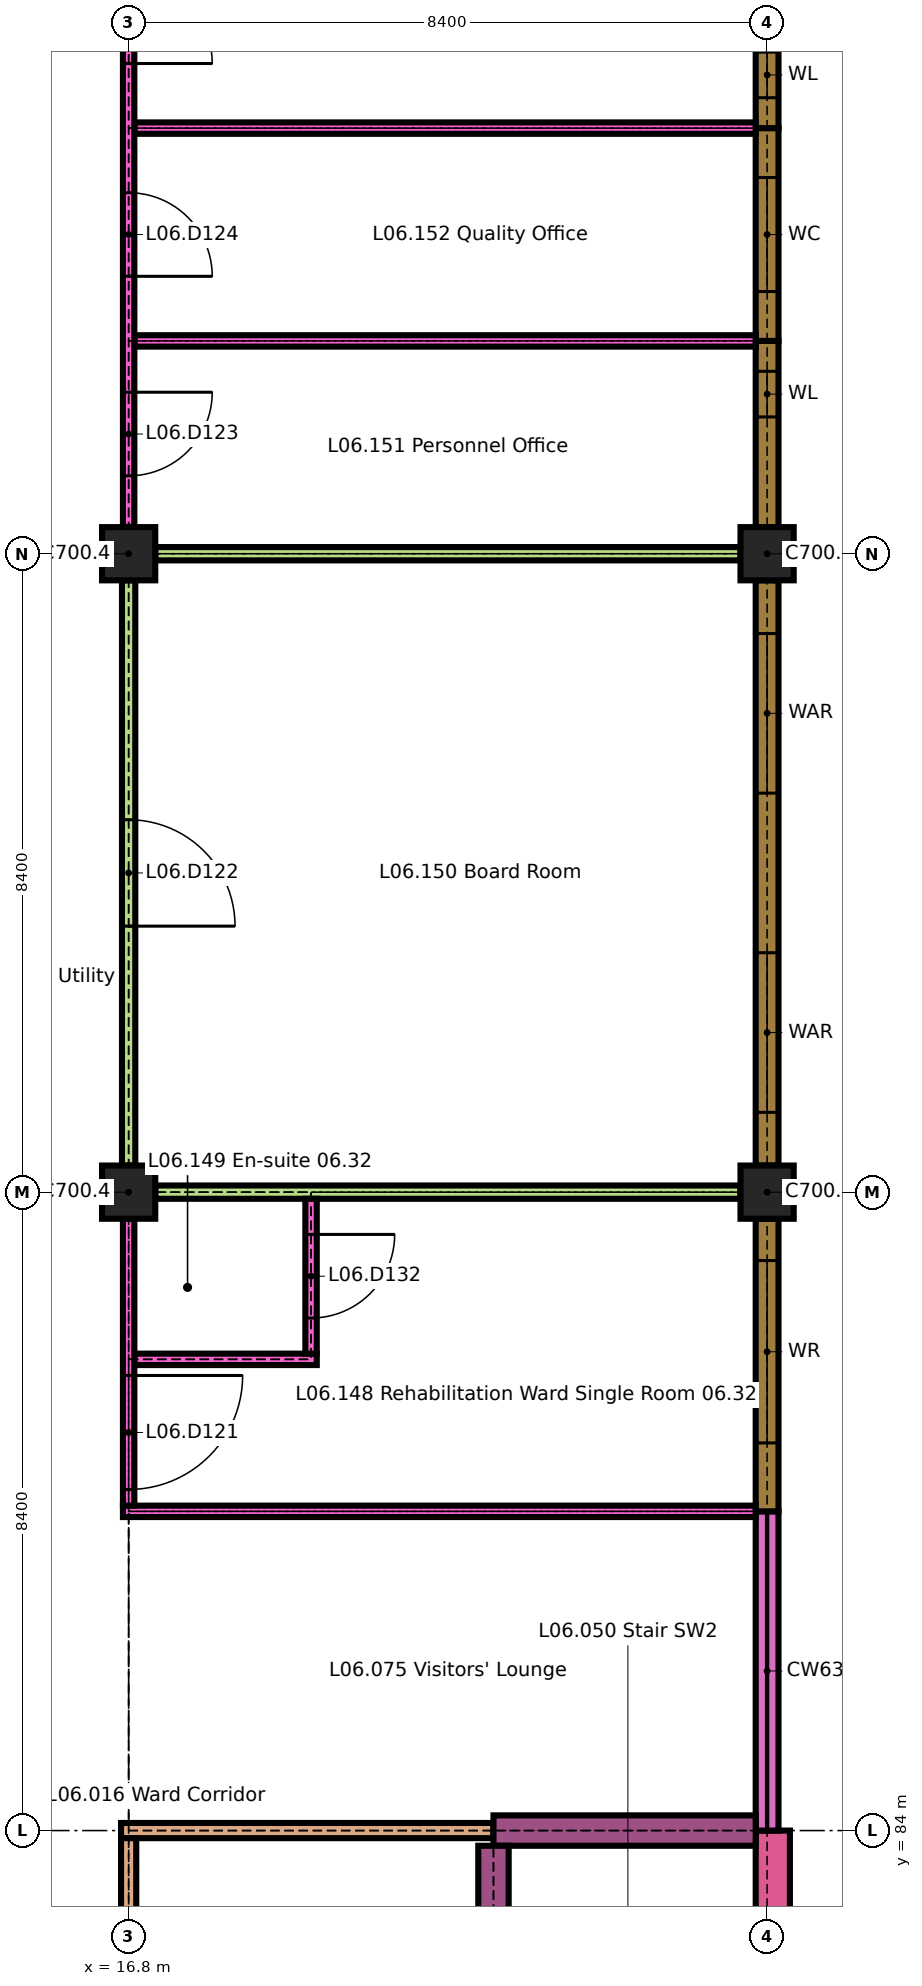
"""IFC4 building model, lengths in metres.
Left out: names, types, materials, properties, quantities, classifications, styles, units other than length and angle.
Written with IfcOpenShell. Run it as: python <this file> out.ifc"""

import sys

from ifc_helpers import new_model, si_unit, direction, frame, frame_2d, origin, origin_2d, place, context, subcontext, project, spatial, rectangle, extrude, element, fill, save


model = new_model("IFC4")
c1 = context("Model", 3, precision=1e-05, world=origin(), true_north=direction((0.0, 1.0)))
c2 = subcontext(c1, "Body", "Model", "MODEL_VIEW")
j1 = project(units=[si_unit("LENGTHUNIT", "METRE"), si_unit("PLANEANGLEUNIT", "RADIAN")], contexts=[c1])
p1 = place(None, origin())
s1 = spatial("IfcSite", under=j1, at=p1, CompositionType="ELEMENT")
p2 = place(p1, origin())
s2 = spatial("IfcBuilding", under=s1, at=p2, CompositionType="ELEMENT")
p3 = place(p2, frame((0.0, 0.0, 26.1)))
s3 = spatial("IfcBuildingStorey", under=s2, at=p3, CompositionType="ELEMENT", Elevation=26.1)
p4 = place(p3, frame((16.8, 92.4, 0.0), z_axis=(0.0, 0.0, 1.0), x_axis=(1.0, 0.0, 0.0)))
e1 = element("IfcColumn", 1, at=p4, inside=s3, PredefinedType="COLUMN", context=c2, shape_type="SweptSolid", body=[
    extrude(rectangle(XDim=0.7, YDim=0.7, at=origin_2d()), origin(), (0.0, 0.0, 1.0), 3.3),
])
p5 = place(p3, frame((25.2, 92.4, 0.0), z_axis=(0.0, 0.0, 1.0), x_axis=(1.0, 0.0, 0.0)))
e2 = element("IfcColumn", 2, at=p5, inside=s3, PredefinedType="COLUMN", context=c2, shape_type="SweptSolid", body=[
    extrude(rectangle(XDim=0.7, YDim=0.7, at=origin_2d()), origin(), (0.0, 0.0, 1.0), 3.2),
])
p6 = place(p3, frame((16.8, 100.8, 0.0), z_axis=(0.0, 0.0, 1.0), x_axis=(1.0, 0.0, 0.0)))
e3 = element("IfcColumn", 3, at=p6, inside=s3, PredefinedType="COLUMN", context=c2, shape_type="SweptSolid", body=[
    extrude(rectangle(XDim=0.7, YDim=0.7, at=origin_2d()), origin(), (0.0, 0.0, 1.0), 3.3),
])
p7 = place(p3, frame((25.2, 100.8, 0.0), z_axis=(0.0, 0.0, 1.0), x_axis=(1.0, 0.0, 0.0)))
e4 = element("IfcColumn", 4, at=p7, inside=s3, PredefinedType="COLUMN", context=c2, shape_type="SweptSolid", body=[
    extrude(rectangle(XDim=0.7, YDim=0.7, at=origin_2d()), origin(), (0.0, 0.0, 1.0), 3.2),
])
p8 = place(p3, frame((25.275, 80.15, 0.0), z_axis=(0.0, 0.0, 1.0), x_axis=(0.0, 1.0, 0.0)))
e5 = element("IfcWall", 5, at=p8, inside=s3, PredefinedType="SOLIDWALL", context=c2, shape_type="SweptSolid", body=[
    extrude(rectangle(XDim=3.85, YDim=0.45, at=frame_2d((1.925, 0.0))), origin(), (0.0, 0.0, 1.0), 3.3),
])
p9 = place(p3, frame((25.2, 84.0, 0.0), z_axis=(0.0, 0.0, 1.0), x_axis=(0.0, 1.0, 0.0)))
e6 = element("IfcWall", 6, at=p9, inside=s3, PredefinedType="SOLIDWALL", context=c2, shape_type="SweptSolid", body=[
    extrude(rectangle(XDim=4.2, YDim=0.3, at=frame_2d((2.1, 0.0))), origin(), (0.0, 0.0, 1.0), 0.6),
])
p10 = place(p3, frame((25.2, 88.2, 0.0), z_axis=(0.0, 0.0, 1.0), x_axis=(0.0, 1.0, 0.0)))
e7 = element("IfcWall", 7, at=p10, inside=s3, PredefinedType="SOLIDWALL", context=c2, shape_type="SweptSolid", body=[
    extrude(rectangle(XDim=3.85, YDim=0.3, at=frame_2d((1.925, 0.0))), origin(), (0.0, 0.0, 1.0), 2.9),
])
p11 = place(p10, frame((0.9, 0.0, 0.6)))
e8 = element("IfcOpeningElement", 8, at=p11, cuts=e7, PredefinedType="OPENING", context=c2, shape_type="SweptSolid", body=[
    extrude(rectangle(XDim=2.4, YDim=1.8, at=frame_2d((1.2, 0.9))), frame((0.0, 0.16, 0.0), z_axis=(0.0, -1.0, 0.0), x_axis=(1.0, 0.0, 0.0)), (0.0, 0.0, 1.0), 0.32),
])
p12 = place(p3, frame((25.2, 92.75, 0.0), z_axis=(0.0, 0.0, 1.0), x_axis=(0.0, 1.0, 0.0)))
e9 = element("IfcWall", 9, at=p12, inside=s3, PredefinedType="SOLIDWALL", context=c2, shape_type="SweptSolid", body=[
    extrude(rectangle(XDim=7.7, YDim=0.3, at=frame_2d((3.85, 0.0))), origin(), (0.0, 0.0, 1.0), 2.9),
])
p13 = place(p12, frame((0.7, 0.0, 0.9)))
e10 = element("IfcOpeningElement", 10, at=p13, cuts=e9, PredefinedType="OPENING", context=c2, shape_type="SweptSolid", body=[
    extrude(rectangle(XDim=2.1, YDim=1.5, at=frame_2d((1.05, 0.75))), frame((0.0, 0.16, 0.0), z_axis=(0.0, -1.0, 0.0), x_axis=(1.0, 0.0, 0.0)), (0.0, 0.0, 1.0), 0.32),
])
p14 = place(p12, frame((4.9, 0.0, 0.9)))
e11 = element("IfcOpeningElement", 11, at=p14, cuts=e9, PredefinedType="OPENING", context=c2, shape_type="SweptSolid", body=[
    extrude(rectangle(XDim=2.1, YDim=1.5, at=frame_2d((1.05, 0.75))), frame((0.0, 0.16, 0.0), z_axis=(0.0, -1.0, 0.0), x_axis=(1.0, 0.0, 0.0)), (0.0, 0.0, 1.0), 0.32),
])
p15 = place(p3, frame((25.2, 101.15, 0.0), z_axis=(0.0, 0.0, 1.0), x_axis=(0.0, 1.0, 0.0)))
e12 = element("IfcWall", 12, at=p15, inside=s3, PredefinedType="SOLIDWALL", context=c2, shape_type="SweptSolid", body=[
    extrude(rectangle(XDim=2.45, YDim=0.3, at=frame_2d((1.225, 0.0))), origin(), (0.0, 0.0, 1.0), 2.9),
])
p16 = place(p15, frame((1.45, 0.0, 0.9)))
e13 = element("IfcOpeningElement", 13, at=p16, cuts=e12, PredefinedType="OPENING", context=c2, shape_type="SweptSolid", body=[
    extrude(rectangle(XDim=0.6, YDim=1.5, at=frame_2d((0.3, 0.75))), frame((0.0, 0.16, 0.0), z_axis=(0.0, -1.0, 0.0), x_axis=(1.0, 0.0, 0.0)), (0.0, 0.0, 1.0), 0.32),
])
p17 = place(p3, frame((25.2, 103.6, 0.0), z_axis=(0.0, 0.0, 1.0), x_axis=(0.0, 1.0, 0.0)))
e14 = element("IfcWall", 14, at=p17, inside=s3, PredefinedType="SOLIDWALL", context=c2, shape_type="SweptSolid", body=[
    extrude(rectangle(XDim=2.8, YDim=0.3, at=frame_2d((1.4, 0.0))), origin(), (0.0, 0.0, 1.0), 2.9),
])
p18 = place(p17, frame((0.65, 0.0, 0.9)))
e15 = element("IfcOpeningElement", 15, at=p18, cuts=e14, PredefinedType="OPENING", context=c2, shape_type="SweptSolid", body=[
    extrude(rectangle(XDim=1.5, YDim=1.5, at=frame_2d((0.75, 0.75))), frame((0.0, 0.16, 0.0), z_axis=(0.0, -1.0, 0.0), x_axis=(1.0, 0.0, 0.0)), (0.0, 0.0, 1.0), 0.32),
])
p19 = place(p3, frame((25.2, 106.4, 0.0), z_axis=(0.0, 0.0, 1.0), x_axis=(0.0, 1.0, 0.0)))
e16 = element("IfcWall", 16, at=p19, inside=s3, PredefinedType="SOLIDWALL", context=c2, shape_type="SweptSolid", body=[
    extrude(rectangle(XDim=2.8, YDim=0.3, at=frame_2d((1.4, 0.0))), origin(), (0.0, 0.0, 1.0), 2.9),
])
p20 = place(p19, frame((0.4, 0.0, 0.9)))
e17 = element("IfcOpeningElement", 17, at=p20, cuts=e16, PredefinedType="OPENING", context=c2, shape_type="SweptSolid", body=[
    extrude(rectangle(XDim=0.6, YDim=1.5, at=frame_2d((0.3, 0.75))), frame((0.0, 0.16, 0.0), z_axis=(0.0, -1.0, 0.0), x_axis=(1.0, 0.0, 0.0)), (0.0, 0.0, 1.0), 0.32),
])
p21 = place(p3, frame((16.7, 84.0, 0.0), z_axis=(0.0, 0.0, 1.0), x_axis=(1.0, 0.0, 0.0)))
e18 = element("IfcWall", 18, at=p21, inside=s3, PredefinedType="PARTITIONING", context=c2, shape_type="SweptSolid", body=[
    extrude(rectangle(XDim=4.9, YDim=0.2, at=frame_2d((2.45, 0.0))), origin(), (0.0, 0.0, 1.0), 3.3),
])
p22 = place(p3, frame((21.6, 84.0, 0.0), z_axis=(0.0, 0.0, 1.0), x_axis=(1.0, 0.0, 0.0)))
e19 = element("IfcWall", 19, at=p22, inside=s3, PredefinedType="SHEAR", context=c2, shape_type="SweptSolid", body=[
    extrude(rectangle(XDim=3.45, YDim=0.4, at=frame_2d((1.725, 0.0))), origin(), (0.0, 0.0, 1.0), 3.3),
])
p23 = place(p3, frame((16.725, 88.2, 0.0), z_axis=(0.0, 0.0, 1.0), x_axis=(1.0, 0.0, 0.0)))
e20 = element("IfcWall", 20, at=p23, inside=s3, PredefinedType="PARTITIONING", context=c2, shape_type="SweptSolid", body=[
    extrude(rectangle(XDim=8.325, YDim=0.15, at=frame_2d((4.163, 0.0))), origin(), (0.0, 0.0, 1.0), 3.3),
])
p24 = place(p3, frame((16.875, 90.2, 0.0), z_axis=(0.0, 0.0, 1.0), x_axis=(1.0, 0.0, 0.0)))
e21 = element("IfcWall", 21, at=p24, inside=s3, PredefinedType="PARTITIONING", context=c2, shape_type="SweptSolid", body=[
    extrude(rectangle(XDim=2.4, YDim=0.15, at=frame_2d((1.2, 0.0))), origin(), (0.0, 0.0, 1.0), 3.3),
])
for number, where, z_axis, x_axis in (
    (22, (17.15, 92.4, 0.0), (0.0, 0.0, 1.0), (1.0, 0.0, 0.0)),
    (23, (17.15, 100.8, 0.0), (0.0, 0.0, 1.0), (1.0, 0.0, 0.0)),
):
    element("IfcWall", number, at=place(p3, frame(where, z_axis=z_axis, x_axis=x_axis)), inside=s3, PredefinedType="PARTITIONING", context=c2, shape_type="SweptSolid", body=[
        extrude(rectangle(XDim=7.7, YDim=0.175, at=frame_2d((3.85, 0.0))), origin(), (0.0, 0.0, 1.0), 3.3),
    ])
for number, where, z_axis, x_axis in (
    (24, (16.875, 103.6, 0.0), (0.0, 0.0, 1.0), (1.0, 0.0, 0.0)),
    (25, (16.875, 106.4, 0.0), (0.0, 0.0, 1.0), (1.0, 0.0, 0.0)),
):
    element("IfcWall", number, at=place(p3, frame(where, z_axis=z_axis, x_axis=x_axis)), inside=s3, PredefinedType="PARTITIONING", context=c2, shape_type="SweptSolid", body=[
        extrude(rectangle(XDim=8.175, YDim=0.15, at=frame_2d((4.087, 0.0))), origin(), (0.0, 0.0, 1.0), 3.3),
    ])
p25 = place(p3, frame((16.8, 75.7, 0.0), z_axis=(0.0, 0.0, 1.0), x_axis=(0.0, 1.0, 0.0)))
e26 = element("IfcWall", 26, at=p25, inside=s3, PredefinedType="PARTITIONING", context=c2, shape_type="SweptSolid", body=[
    extrude(rectangle(XDim=8.2, YDim=0.2, at=frame_2d((4.1, 0.0))), origin(), (0.0, 0.0, 1.0), 3.3),
])
p26 = place(p25, frame((3.1, 0.0, 0.0)))
e27 = element("IfcOpeningElement", 27, at=p26, cuts=e26, PredefinedType="OPENING", context=c2, shape_type="SweptSolid", body=[
    extrude(rectangle(XDim=2.0, YDim=2.4, at=frame_2d((1.0, 1.2))), frame((0.0, 0.11, 0.0), z_axis=(0.0, -1.0, 0.0), x_axis=(1.0, 0.0, 0.0)), (0.0, 0.0, 1.0), 0.22),
])
p27 = place(p3, frame((16.8, 88.275, 0.0), z_axis=(0.0, 0.0, 1.0), x_axis=(0.0, 1.0, 0.0)))
e28 = element("IfcWall", 28, at=p27, inside=s3, PredefinedType="PARTITIONING", context=c2, shape_type="SweptSolid", body=[
    extrude(rectangle(XDim=3.775, YDim=0.15, at=frame_2d((1.888, 0.0))), origin(), (0.0, 0.0, 1.0), 3.3),
])
p28 = place(p27, frame((0.212, 0.0, 0.0)))
e29 = element("IfcOpeningElement", 29, at=p28, cuts=e28, PredefinedType="OPENING", context=c2, shape_type="SweptSolid", body=[
    extrude(rectangle(XDim=1.5, YDim=2.4, at=frame_2d((0.75, 1.2))), frame((0.0, 0.085, 0.0), z_axis=(0.0, -1.0, 0.0), x_axis=(1.0, 0.0, 0.0)), (0.0, 0.0, 1.0), 0.17),
])
p29 = place(p3, frame((16.8, 92.75, 0.0), z_axis=(0.0, 0.0, 1.0), x_axis=(0.0, 1.0, 0.0)))
e30 = element("IfcWall", 30, at=p29, inside=s3, PredefinedType="PARTITIONING", context=c2, shape_type="SweptSolid", body=[
    extrude(rectangle(XDim=7.7, YDim=0.175, at=frame_2d((3.85, 0.0))), origin(), (0.0, 0.0, 1.0), 3.3),
])
p30 = place(p29, frame((3.15, 0.0, 0.0)))
e31 = element("IfcOpeningElement", 31, at=p30, cuts=e30, PredefinedType="OPENING", context=c2, shape_type="SweptSolid", body=[
    extrude(rectangle(XDim=1.4, YDim=2.1, at=frame_2d((0.7, 1.05))), frame((0.0, 0.097, 0.0), z_axis=(0.0, -1.0, 0.0), x_axis=(1.0, 0.0, 0.0)), (0.0, 0.0, 1.0), 0.195),
])
p31 = place(p3, frame((16.8, 101.15, 0.0), z_axis=(0.0, 0.0, 1.0), x_axis=(0.0, 1.0, 0.0)))
e32 = element("IfcWall", 32, at=p31, inside=s3, PredefinedType="PARTITIONING", context=c2, shape_type="SweptSolid", body=[
    extrude(rectangle(XDim=8.05, YDim=0.15, at=frame_2d((4.025, 0.0))), origin(), (0.0, 0.0, 1.0), 3.3),
])
p32 = place(p31, frame((0.675, 0.0, 0.0)))
e33 = element("IfcOpeningElement", 33, at=p32, cuts=e32, PredefinedType="OPENING", context=c2, shape_type="SweptSolid", body=[
    extrude(rectangle(XDim=1.1, YDim=2.1, at=frame_2d((0.55, 1.05))), frame((0.0, 0.085, 0.0), z_axis=(0.0, -1.0, 0.0), x_axis=(1.0, 0.0, 0.0)), (0.0, 0.0, 1.0), 0.17),
])
p33 = place(p31, frame((3.3, 0.0, 0.0)))
e34 = element("IfcOpeningElement", 34, at=p33, cuts=e32, PredefinedType="OPENING", context=c2, shape_type="SweptSolid", body=[
    extrude(rectangle(XDim=1.1, YDim=2.1, at=frame_2d((0.55, 1.05))), frame((0.0, 0.085, 0.0), z_axis=(0.0, -1.0, 0.0), x_axis=(1.0, 0.0, 0.0)), (0.0, 0.0, 1.0), 0.17),
])
p34 = place(p31, frame((6.1, 0.0, 0.0)))
e35 = element("IfcOpeningElement", 35, at=p34, cuts=e32, PredefinedType="OPENING", context=c2, shape_type="SweptSolid", body=[
    extrude(rectangle(XDim=1.1, YDim=2.1, at=frame_2d((0.55, 1.05))), frame((0.0, 0.085, 0.0), z_axis=(0.0, -1.0, 0.0), x_axis=(1.0, 0.0, 0.0)), (0.0, 0.0, 1.0), 0.17),
])
p35 = place(p3, frame((19.2, 90.275, 0.0), z_axis=(0.0, 0.0, 1.0), x_axis=(0.0, 1.0, 0.0)))
e36 = element("IfcWall", 36, at=p35, inside=s3, PredefinedType="PARTITIONING", context=c2, shape_type="SweptSolid", body=[
    extrude(rectangle(XDim=2.038, YDim=0.15, at=frame_2d((1.019, 0.0))), origin(), (0.0, 0.0, 1.0), 3.3),
])
p36 = place(p35, frame((0.469, 0.0, 0.0)))
e37 = element("IfcOpeningElement", 37, at=p36, cuts=e36, PredefinedType="OPENING", context=c2, shape_type="SweptSolid", body=[
    extrude(rectangle(XDim=1.1, YDim=2.1, at=frame_2d((0.55, 1.05))), frame((0.0, 0.085, 0.0), z_axis=(0.0, -1.0, 0.0), x_axis=(1.0, 0.0, 0.0)), (0.0, 0.0, 1.0), 0.17),
])
p37 = place(p3, frame((21.6, 75.8, 0.0), z_axis=(0.0, 0.0, 1.0), x_axis=(0.0, 1.0, 0.0)))
e38 = element("IfcWall", 38, at=p37, inside=s3, PredefinedType="SHEAR", context=c2, shape_type="SweptSolid", body=[
    extrude(rectangle(XDim=8.0, YDim=0.4, at=frame_2d((4.0, 0.0))), origin(), (0.0, 0.0, 1.0), 3.3),
])
p38 = place(p37, frame((0.4, 0.0, 0.0)))
e39 = element("IfcOpeningElement", 39, at=p38, cuts=e38, PredefinedType="OPENING", context=c2, shape_type="SweptSolid", body=[
    extrude(rectangle(XDim=1.2, YDim=2.1, at=frame_2d((0.6, 1.05))), frame((0.0, 0.21, 0.0), z_axis=(0.0, -1.0, 0.0), x_axis=(1.0, 0.0, 0.0)), (0.0, 0.0, 1.0), 0.42),
])
p39 = place(p11, origin())
e40 = element("IfcWindow", 40, at=p39, inside=s3, PartitioningType="DOUBLE_PANEL_VERTICAL", PredefinedType="WINDOW", context=c2, shape_type="SweptSolid", body=[
    extrude(rectangle(XDim=2.4, YDim=1.8, at=frame_2d((1.2, 0.9))), frame((0.0, 0.03, 0.0), z_axis=(0.0, -1.0, 0.0), x_axis=(1.0, 0.0, 0.0)), (0.0, 0.0, 1.0), 0.06),
])
fill(e8, e40)
p40 = place(p13, origin())
e41 = element("IfcWindow", 41, at=p40, inside=s3, PartitioningType="DOUBLE_PANEL_VERTICAL", PredefinedType="WINDOW", context=c2, shape_type="SweptSolid", body=[
    extrude(rectangle(XDim=2.1, YDim=1.5, at=frame_2d((1.05, 0.75))), frame((0.0, 0.05, 0.0), z_axis=(0.0, -1.0, 0.0), x_axis=(1.0, 0.0, 0.0)), (0.0, 0.0, 1.0), 0.1),
])
fill(e10, e41)
p41 = place(p14, origin())
e42 = element("IfcWindow", 42, at=p41, inside=s3, PartitioningType="DOUBLE_PANEL_VERTICAL", PredefinedType="WINDOW", context=c2, shape_type="SweptSolid", body=[
    extrude(rectangle(XDim=2.1, YDim=1.5, at=frame_2d((1.05, 0.75))), frame((0.0, 0.05, 0.0), z_axis=(0.0, -1.0, 0.0), x_axis=(1.0, 0.0, 0.0)), (0.0, 0.0, 1.0), 0.1),
])
fill(e11, e42)
p42 = place(p16, origin())
e43 = element("IfcWindow", 43, at=p42, inside=s3, PartitioningType="SINGLE_PANEL", PredefinedType="WINDOW", context=c2, shape_type="SweptSolid", body=[
    extrude(rectangle(XDim=0.6, YDim=1.5, at=frame_2d((0.3, 0.75))), frame((0.0, 0.03, 0.0), z_axis=(0.0, -1.0, 0.0), x_axis=(1.0, 0.0, 0.0)), (0.0, 0.0, 1.0), 0.06),
])
fill(e13, e43)
p43 = place(p18, origin())
e44 = element("IfcWindow", 44, at=p43, inside=s3, PartitioningType="SINGLE_PANEL", PredefinedType="WINDOW", context=c2, shape_type="SweptSolid", body=[
    extrude(rectangle(XDim=1.5, YDim=1.5, at=frame_2d((0.75, 0.75))), frame((0.0, 0.03, 0.0), z_axis=(0.0, -1.0, 0.0), x_axis=(1.0, 0.0, 0.0)), (0.0, 0.0, 1.0), 0.06),
])
fill(e15, e44)
p44 = place(p20, origin())
e45 = element("IfcWindow", 45, at=p44, inside=s3, PartitioningType="SINGLE_PANEL", PredefinedType="WINDOW", context=c2, shape_type="SweptSolid", body=[
    extrude(rectangle(XDim=0.6, YDim=1.5, at=frame_2d((0.3, 0.75))), frame((0.0, 0.03, 0.0), z_axis=(0.0, -1.0, 0.0), x_axis=(1.0, 0.0, 0.0)), (0.0, 0.0, 1.0), 0.06),
])
fill(e17, e45)
p45 = place(p28, origin())
e46 = element("IfcDoor", 46, at=p45, inside=s3, OperationType="SINGLE_SWING_RIGHT", PredefinedType="DOOR", context=c2, shape_type="SweptSolid", body=[
    extrude(rectangle(XDim=1.5, YDim=2.4, at=frame_2d((0.75, 1.2))), frame((0.0, 0.03, 0.0), z_axis=(0.0, -1.0, 0.0), x_axis=(1.0, 0.0, 0.0)), (0.0, 0.0, 1.0), 0.06),
])
fill(e29, e46)
p46 = place(p30, origin())
e47 = element("IfcDoor", 47, at=p46, inside=s3, OperationType="SINGLE_SWING_LEFT", PredefinedType="DOOR", context=c2, shape_type="SweptSolid", body=[
    extrude(rectangle(XDim=1.4, YDim=2.1, at=frame_2d((0.7, 1.05))), frame((0.0, 0.025, 0.0), z_axis=(0.0, -1.0, 0.0), x_axis=(1.0, 0.0, 0.0)), (0.0, 0.0, 1.0), 0.05),
])
fill(e31, e47)
p47 = place(p32, origin())
e48 = element("IfcDoor", 48, at=p47, inside=s3, OperationType="SINGLE_SWING_RIGHT", PredefinedType="DOOR", context=c2, shape_type="SweptSolid", body=[
    extrude(rectangle(XDim=1.1, YDim=2.1, at=frame_2d((0.55, 1.05))), frame((0.0, 0.025, 0.0), z_axis=(0.0, -1.0, 0.0), x_axis=(1.0, 0.0, 0.0)), (0.0, 0.0, 1.0), 0.05),
])
fill(e33, e48)
p48 = place(p33, origin())
e49 = element("IfcDoor", 49, at=p48, inside=s3, OperationType="SINGLE_SWING_LEFT", PredefinedType="DOOR", context=c2, shape_type="SweptSolid", body=[
    extrude(rectangle(XDim=1.1, YDim=2.1, at=frame_2d((0.55, 1.05))), frame((0.0, 0.025, 0.0), z_axis=(0.0, -1.0, 0.0), x_axis=(1.0, 0.0, 0.0)), (0.0, 0.0, 1.0), 0.05),
])
fill(e34, e49)
p49 = place(p34, origin())
e50 = element("IfcDoor", 50, at=p49, inside=s3, OperationType="SINGLE_SWING_LEFT", PredefinedType="DOOR", context=c2, shape_type="SweptSolid", body=[
    extrude(rectangle(XDim=1.1, YDim=2.1, at=frame_2d((0.55, 1.05))), frame((0.0, 0.025, 0.0), z_axis=(0.0, -1.0, 0.0), x_axis=(1.0, 0.0, 0.0)), (0.0, 0.0, 1.0), 0.05),
])
fill(e35, e50)
p50 = place(p36, origin())
e51 = element("IfcDoor", 51, at=p50, inside=s3, OperationType="SINGLE_SWING_RIGHT", PredefinedType="DOOR", context=c2, shape_type="SweptSolid", body=[
    extrude(rectangle(XDim=1.1, YDim=2.1, at=frame_2d((0.55, 1.05))), frame((0.0, 0.025, 0.0), z_axis=(0.0, -1.0, 0.0), x_axis=(1.0, 0.0, 0.0)), (0.0, 0.0, 1.0), 0.05),
])
fill(e37, e51)
save(model, sys.argv[1])
